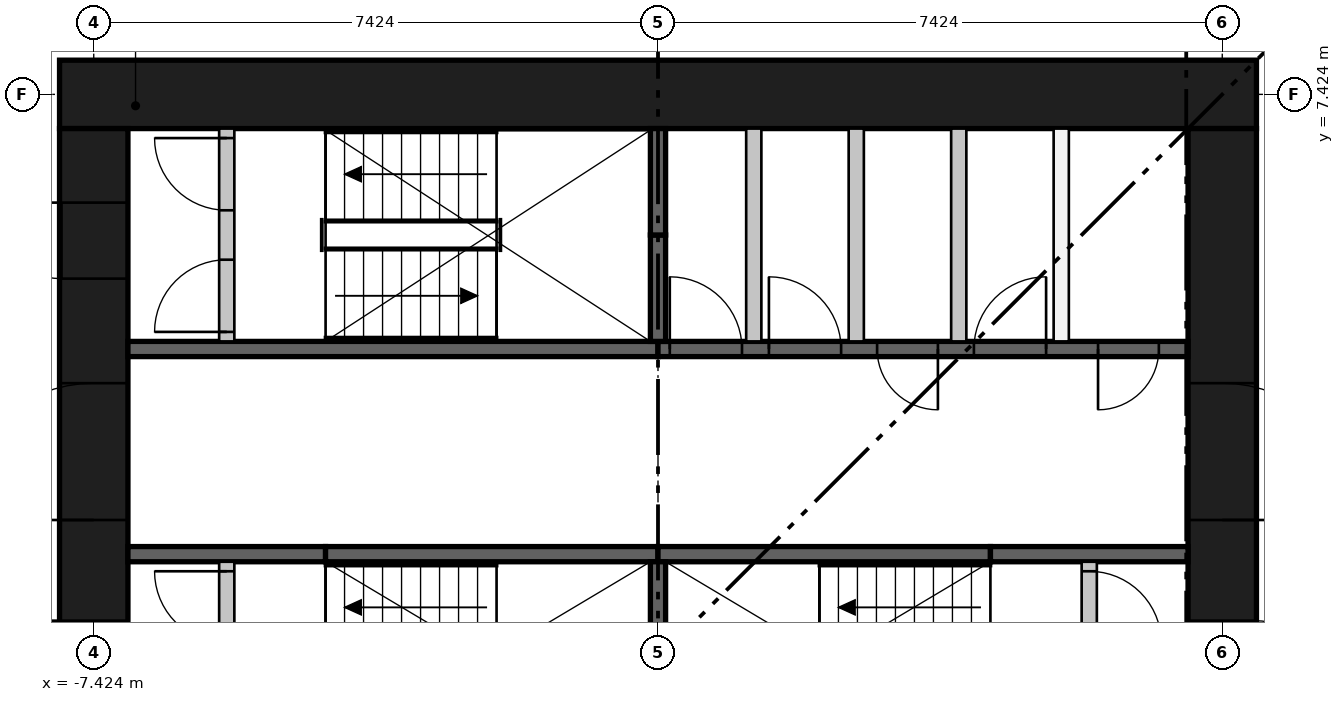
"""IFC4 building model, lengths in metres.
Left out: names, types, materials, properties, quantities, classifications, styles, units other than length and angle.
Written with IfcOpenShell. Run it as: python <this file> out.ifc"""

import sys

from ifc_helpers import new_model, si_unit, direction, frame, frame_2d, origin, place, context, subcontext, project, spatial, rectangle, extrude, element, fill, save


model = new_model("IFC4")
c1 = context("Model", 3, precision=1e-05, world=origin(), true_north=direction((0.0, 1.0)))
c2 = subcontext(c1, "Body", "Model", "MODEL_VIEW")
j1 = project(units=[si_unit("LENGTHUNIT", "METRE"), si_unit("PLANEANGLEUNIT", "RADIAN")], contexts=[c1])
p1 = place(None, origin())
s1 = spatial("IfcSite", under=j1, at=p1, CompositionType="ELEMENT")
p2 = place(p1, origin())
s2 = spatial("IfcBuilding", under=s1, at=p2, CompositionType="ELEMENT")
p3 = place(p2, frame((0.0, 0.0, 48.1)))
s3 = spatial("IfcBuildingStorey", under=s2, at=p3, CompositionType="ELEMENT", Elevation=48.1)
p4 = place(p3, frame((-7.874, 7.424, 0.0), z_axis=(0.0, 0.0, 1.0), x_axis=(1.0, 0.0, 0.0)))
e1 = element("IfcWall", 1, at=p4, inside=s3, PredefinedType="SHEAR", context=c2, shape_type="SweptSolid", body=[
    extrude(rectangle(XDim=15.748, YDim=0.9, at=frame_2d((7.874, 0.0))), origin(), (0.0, 0.0, 1.0), 3.65),
])
p5 = place(p3, frame((-7.424, -6.974, 0.0), z_axis=(0.0, 0.0, 1.0), x_axis=(0.0, 1.0, 0.0)))
e2 = element("IfcWall", 2, at=p5, inside=s3, PredefinedType="SHEAR", context=c2, shape_type="SweptSolid", body=[
    extrude(rectangle(XDim=13.948, YDim=0.9, at=frame_2d((6.974, 0.0))), origin(), (0.0, 0.0, 1.0), 3.65),
])
p6 = place(p5, frame((6.474, 0.0, 0.0)))
e3 = element("IfcOpeningElement", 3, at=p6, cuts=e2, PredefinedType="OPENING", context=c2, shape_type="SweptSolid", body=[
    extrude(rectangle(XDim=1.0, YDim=2.1, at=frame_2d((0.5, 1.05))), frame((0.0, 0.46, 0.0), z_axis=(0.0, -1.0, 0.0), x_axis=(1.0, 0.0, 0.0)), (0.0, 0.0, 1.0), 0.92),
])
p7 = place(p5, frame((3.35, 0.0, 0.0)))
e4 = element("IfcOpeningElement", 4, at=p7, cuts=e2, PredefinedType="OPENING", context=c2, shape_type="SweptSolid", body=[
    extrude(rectangle(XDim=1.8, YDim=2.1, at=frame_2d((0.9, 1.05))), frame((0.0, 0.46, 0.0), z_axis=(0.0, -1.0, 0.0), x_axis=(1.0, 0.0, 0.0)), (0.0, 0.0, 1.0), 0.92),
])
p8 = place(p5, frame((8.799, 0.0, 0.0)))
e5 = element("IfcOpeningElement", 5, at=p8, cuts=e2, PredefinedType="OPENING", context=c2, shape_type="SweptSolid", body=[
    extrude(rectangle(XDim=1.8, YDim=2.1, at=frame_2d((0.9, 1.05))), frame((0.0, 0.46, 0.0), z_axis=(0.0, -1.0, 0.0), x_axis=(1.0, 0.0, 0.0)), (0.0, 0.0, 1.0), 0.92),
])
p9 = place(p5, frame((11.974, 0.0, 0.0)))
e6 = element("IfcOpeningElement", 6, at=p9, cuts=e2, PredefinedType="OPENING", context=c2, shape_type="SweptSolid", body=[
    extrude(rectangle(XDim=1.0, YDim=2.1, at=frame_2d((0.5, 1.05))), frame((0.0, 0.46, 0.0), z_axis=(0.0, -1.0, 0.0), x_axis=(1.0, 0.0, 0.0)), (0.0, 0.0, 1.0), 0.92),
])
p10 = place(p3, frame((7.424, -6.974, 0.0), z_axis=(0.0, 0.0, 1.0), x_axis=(0.0, 1.0, 0.0)))
e7 = element("IfcWall", 7, at=p10, inside=s3, PredefinedType="SHEAR", context=c2, shape_type="SweptSolid", body=[
    extrude(rectangle(XDim=13.948, YDim=0.9, at=frame_2d((6.974, 0.0))), origin(), (0.0, 0.0, 1.0), 3.65),
])
p11 = place(p10, frame((6.474, 0.0, 0.0)))
e8 = element("IfcOpeningElement", 8, at=p11, cuts=e7, PredefinedType="OPENING", context=c2, shape_type="SweptSolid", body=[
    extrude(rectangle(XDim=1.0, YDim=2.1, at=frame_2d((0.5, 1.05))), frame((0.0, 0.46, 0.0), z_axis=(0.0, -1.0, 0.0), x_axis=(1.0, 0.0, 0.0)), (0.0, 0.0, 1.0), 0.92),
])
p12 = place(p10, frame((3.35, 0.0, 0.0)))
e9 = element("IfcOpeningElement", 9, at=p12, cuts=e7, PredefinedType="OPENING", context=c2, shape_type="SweptSolid", body=[
    extrude(rectangle(XDim=1.8, YDim=2.1, at=frame_2d((0.9, 1.05))), frame((0.0, 0.46, 0.0), z_axis=(0.0, -1.0, 0.0), x_axis=(1.0, 0.0, 0.0)), (0.0, 0.0, 1.0), 0.92),
])
p13 = place(p10, frame((8.799, 0.0, 0.0)))
e10 = element("IfcOpeningElement", 10, at=p13, cuts=e7, PredefinedType="OPENING", context=c2, shape_type="SweptSolid", body=[
    extrude(rectangle(XDim=1.8, YDim=2.1, at=frame_2d((0.9, 1.05))), frame((0.0, 0.46, 0.0), z_axis=(0.0, -1.0, 0.0), x_axis=(1.0, 0.0, 0.0)), (0.0, 0.0, 1.0), 0.92),
])
p14 = place(p3, frame((-6.974, 4.074, 0.0), z_axis=(0.0, 0.0, 1.0), x_axis=(1.0, 0.0, 0.0)))
e11 = element("IfcWall", 11, at=p14, inside=s3, PredefinedType="SHEAR", context=c2, shape_type="SweptSolid", body=[
    extrude(rectangle(XDim=6.974, YDim=0.2, at=frame_2d((3.487, 0.0))), origin(), (0.0, 0.0, 1.0), 3.3),
])
p15 = place(p3, frame((0.0, 4.074, 0.0), z_axis=(0.0, 0.0, 1.0), x_axis=(1.0, 0.0, 0.0)))
e12 = element("IfcWall", 12, at=p15, inside=s3, PredefinedType="SHEAR", context=c2, shape_type="SweptSolid", body=[
    extrude(rectangle(XDim=6.974, YDim=0.2, at=frame_2d((3.487, 0.0))), origin(), (0.0, 0.0, 1.0), 3.3),
])
p16 = place(p15, frame((0.155, 0.0, 0.0)))
e13 = element("IfcOpeningElement", 13, at=p16, cuts=e12, PredefinedType="OPENING", context=c2, shape_type="SweptSolid", body=[
    extrude(rectangle(XDim=0.95, YDim=2.1, at=frame_2d((0.475, 1.05))), frame((0.0, 0.11, 0.0), z_axis=(0.0, -1.0, 0.0), x_axis=(1.0, 0.0, 0.0)), (0.0, 0.0, 1.0), 0.22),
])
p17 = place(p15, frame((1.459, 0.0, 0.0)))
e14 = element("IfcOpeningElement", 14, at=p17, cuts=e12, PredefinedType="OPENING", context=c2, shape_type="SweptSolid", body=[
    extrude(rectangle(XDim=0.95, YDim=2.1, at=frame_2d((0.475, 1.05))), frame((0.0, 0.11, 0.0), z_axis=(0.0, -1.0, 0.0), x_axis=(1.0, 0.0, 0.0)), (0.0, 0.0, 1.0), 0.22),
])
p18 = place(p15, frame((2.883, 0.0, 0.0)))
e15 = element("IfcOpeningElement", 15, at=p18, cuts=e12, PredefinedType="OPENING", context=c2, shape_type="SweptSolid", body=[
    extrude(rectangle(XDim=0.8, YDim=2.1, at=frame_2d((0.4, 1.05))), frame((0.0, 0.11, 0.0), z_axis=(0.0, -1.0, 0.0), x_axis=(1.0, 0.0, 0.0)), (0.0, 0.0, 1.0), 0.22),
])
p19 = place(p15, frame((4.156, 0.0, 0.0)))
e16 = element("IfcOpeningElement", 16, at=p19, cuts=e12, PredefinedType="OPENING", context=c2, shape_type="SweptSolid", body=[
    extrude(rectangle(XDim=0.95, YDim=2.1, at=frame_2d((0.475, 1.05))), frame((0.0, 0.11, 0.0), z_axis=(0.0, -1.0, 0.0), x_axis=(1.0, 0.0, 0.0)), (0.0, 0.0, 1.0), 0.22),
])
p20 = place(p15, frame((5.79, 0.0, 0.0)))
e17 = element("IfcOpeningElement", 17, at=p20, cuts=e12, PredefinedType="OPENING", context=c2, shape_type="SweptSolid", body=[
    extrude(rectangle(XDim=0.8, YDim=2.1, at=frame_2d((0.4, 1.05))), frame((0.0, 0.11, 0.0), z_axis=(0.0, -1.0, 0.0), x_axis=(1.0, 0.0, 0.0)), (0.0, 0.0, 1.0), 0.22),
])
p21 = place(p3, frame((-6.974, 1.375, 0.0), z_axis=(0.0, 0.0, 1.0), x_axis=(1.0, 0.0, 0.0)))
e18 = element("IfcWall", 18, at=p21, inside=s3, PredefinedType="SHEAR", context=c2, shape_type="SweptSolid", body=[
    extrude(rectangle(XDim=2.6, YDim=0.2, at=frame_2d((1.3, 0.0))), origin(), (0.0, 0.0, 1.0), 3.3),
])
for number, where, z_axis, x_axis in (
    (19, (-4.374, 1.375, 0.0), (0.0, 0.0, 1.0), (1.0, 0.0, 0.0)),
    (20, (0.0, 1.375, 0.0), (0.0, 0.0, 1.0), (1.0, 0.0, 0.0)),
):
    element("IfcWall", number, at=place(p3, frame(where, z_axis=z_axis, x_axis=x_axis)), inside=s3, PredefinedType="SHEAR", context=c2, shape_type="SweptSolid", body=[
        extrude(rectangle(XDim=4.374, YDim=0.2, at=frame_2d((2.187, 0.0))), origin(), (0.0, 0.0, 1.0), 3.3),
    ])
p22 = place(p3, frame((4.374, 1.375, 0.0), z_axis=(0.0, 0.0, 1.0), x_axis=(1.0, 0.0, 0.0)))
e21 = element("IfcWall", 21, at=p22, inside=s3, PredefinedType="SHEAR", context=c2, shape_type="SweptSolid", body=[
    extrude(rectangle(XDim=2.6, YDim=0.2, at=frame_2d((1.3, 0.0))), origin(), (0.0, 0.0, 1.0), 3.3),
])
p23 = place(p3, frame((0.0, -1.275, 0.0), z_axis=(0.0, 0.0, 1.0), x_axis=(0.0, 1.0, 0.0)))
e22 = element("IfcWall", 22, at=p23, inside=s3, PredefinedType="SHEAR", context=c2, shape_type="SweptSolid", body=[
    extrude(rectangle(XDim=2.55, YDim=0.2, at=frame_2d((1.275, 0.0))), origin(), (0.0, 0.0, 1.0), 3.3),
])
p24 = place(p3, frame((0.0, 4.174, 0.0), z_axis=(0.0, 0.0, 1.0), x_axis=(0.0, 1.0, 0.0)))
e23 = element("IfcWall", 23, at=p24, inside=s3, PredefinedType="SHEAR", context=c2, shape_type="SweptSolid", body=[
    extrude(rectangle(XDim=1.4, YDim=0.2, at=frame_2d((0.7, 0.0))), origin(), (0.0, 0.0, 1.0), 3.3),
])
p25 = place(p3, frame((0.0, 5.574, 0.0), z_axis=(0.0, 0.0, 1.0), x_axis=(0.0, 1.0, 0.0)))
e24 = element("IfcWall", 24, at=p25, inside=s3, PredefinedType="SHEAR", context=c2, shape_type="SweptSolid", body=[
    extrude(rectangle(XDim=1.4, YDim=0.2, at=frame_2d((0.7, 0.0))), origin(), (0.0, 0.0, 1.0), 3.3),
])
for number, where, z_axis, x_axis in (
    (25, (1.26, 4.174, 0.0), (0.0, 0.0, 1.0), (0.0, 1.0, 0.0)),
    (26, (2.609, 4.174, 0.0), (0.0, 0.0, 1.0), (0.0, 1.0, 0.0)),
    (27, (3.957, 4.174, 0.0), (0.0, 0.0, 1.0), (0.0, 1.0, 0.0)),
    (28, (5.305, 4.174, 0.0), (0.0, 0.0, 1.0), (0.0, 1.0, 0.0)),
):
    element("IfcWall", number, at=place(p3, frame(where, z_axis=z_axis, x_axis=x_axis)), inside=s3, PredefinedType="PARTITIONING", context=c2, shape_type="SweptSolid", body=[
        extrude(rectangle(XDim=2.8, YDim=0.2, at=frame_2d((1.4, 0.0))), origin(), (0.0, 0.0, 1.0), 3.3),
    ])
p26 = place(p3, frame((-5.674, -1.275, 0.0), z_axis=(0.0, 0.0, 1.0), x_axis=(0.0, 1.0, 0.0)))
e29 = element("IfcWall", 29, at=p26, inside=s3, PredefinedType="PARTITIONING", context=c2, shape_type="SweptSolid", body=[
    extrude(rectangle(XDim=2.55, YDim=0.2, at=frame_2d((1.275, 0.0))), origin(), (0.0, 0.0, 1.0), 3.3),
])
p27 = place(p26, frame((0.125, 0.0, 0.0)))
e30 = element("IfcOpeningElement", 30, at=p27, cuts=e29, PredefinedType="OPENING", context=c2, shape_type="SweptSolid", body=[
    extrude(rectangle(XDim=0.95, YDim=2.1, at=frame_2d((0.475, 1.05))), frame((0.0, 0.11, 0.0), z_axis=(0.0, -1.0, 0.0), x_axis=(1.0, 0.0, 0.0)), (0.0, 0.0, 1.0), 0.22),
])
p28 = place(p26, frame((1.475, 0.0, 0.0)))
e31 = element("IfcOpeningElement", 31, at=p28, cuts=e29, PredefinedType="OPENING", context=c2, shape_type="SweptSolid", body=[
    extrude(rectangle(XDim=0.95, YDim=2.1, at=frame_2d((0.475, 1.05))), frame((0.0, 0.11, 0.0), z_axis=(0.0, -1.0, 0.0), x_axis=(1.0, 0.0, 0.0)), (0.0, 0.0, 1.0), 0.22),
])
p29 = place(p3, frame((5.674, -1.275, 0.0), z_axis=(0.0, 0.0, 1.0), x_axis=(0.0, 1.0, 0.0)))
e32 = element("IfcWall", 32, at=p29, inside=s3, PredefinedType="PARTITIONING", context=c2, shape_type="SweptSolid", body=[
    extrude(rectangle(XDim=2.55, YDim=0.2, at=frame_2d((1.275, 0.0))), origin(), (0.0, 0.0, 1.0), 3.3),
])
p30 = place(p29, frame((0.125, 0.0, 0.0)))
e33 = element("IfcOpeningElement", 33, at=p30, cuts=e32, PredefinedType="OPENING", context=c2, shape_type="SweptSolid", body=[
    extrude(rectangle(XDim=0.95, YDim=2.1, at=frame_2d((0.475, 1.05))), frame((0.0, 0.11, 0.0), z_axis=(0.0, -1.0, 0.0), x_axis=(1.0, 0.0, 0.0)), (0.0, 0.0, 1.0), 0.22),
])
p31 = place(p29, frame((1.475, 0.0, 0.0)))
e34 = element("IfcOpeningElement", 34, at=p31, cuts=e32, PredefinedType="OPENING", context=c2, shape_type="SweptSolid", body=[
    extrude(rectangle(XDim=0.95, YDim=2.1, at=frame_2d((0.475, 1.05))), frame((0.0, 0.11, 0.0), z_axis=(0.0, -1.0, 0.0), x_axis=(1.0, 0.0, 0.0)), (0.0, 0.0, 1.0), 0.22),
])
p32 = place(p3, frame((-5.674, 4.174, 0.0), z_axis=(0.0, 0.0, 1.0), x_axis=(0.0, 1.0, 0.0)))
e35 = element("IfcWall", 35, at=p32, inside=s3, PredefinedType="PARTITIONING", context=c2, shape_type="SweptSolid", body=[
    extrude(rectangle(XDim=2.8, YDim=0.2, at=frame_2d((1.4, 0.0))), origin(), (0.0, 0.0, 1.0), 3.3),
])
p33 = place(p32, frame((0.125, 0.0, 0.0)))
e36 = element("IfcOpeningElement", 36, at=p33, cuts=e35, PredefinedType="OPENING", context=c2, shape_type="SweptSolid", body=[
    extrude(rectangle(XDim=0.95, YDim=2.1, at=frame_2d((0.475, 1.05))), frame((0.0, 0.11, 0.0), z_axis=(0.0, -1.0, 0.0), x_axis=(1.0, 0.0, 0.0)), (0.0, 0.0, 1.0), 0.22),
])
p34 = place(p32, frame((1.725, 0.0, 0.0)))
e37 = element("IfcOpeningElement", 37, at=p34, cuts=e35, PredefinedType="OPENING", context=c2, shape_type="SweptSolid", body=[
    extrude(rectangle(XDim=0.95, YDim=2.1, at=frame_2d((0.475, 1.05))), frame((0.0, 0.11, 0.0), z_axis=(0.0, -1.0, 0.0), x_axis=(1.0, 0.0, 0.0)), (0.0, 0.0, 1.0), 0.22),
])
p35 = place(p28, origin())
e38 = element("IfcDoor", 38, at=p35, inside=s3, OperationType="SINGLE_SWING_RIGHT", PredefinedType="DOOR", context=c2, shape_type="SweptSolid", body=[
    extrude(rectangle(XDim=0.95, YDim=2.1, at=frame_2d((0.475, 1.05))), frame((0.0, 0.025, 0.0), z_axis=(0.0, -1.0, 0.0), x_axis=(1.0, 0.0, 0.0)), (0.0, 0.0, 1.0), 0.05),
])
fill(e31, e38)
p36 = place(p31, frame((0.95, 0.0, 0.0), z_axis=(0.0, 0.0, 1.0), x_axis=(-1.0, 0.0, 0.0)))
e39 = element("IfcDoor", 39, at=p36, inside=s3, OperationType="SINGLE_SWING_LEFT", PredefinedType="DOOR", context=c2, shape_type="SweptSolid", body=[
    extrude(rectangle(XDim=0.95, YDim=2.1, at=frame_2d((0.475, 1.05))), frame((0.0, 0.025, 0.0), z_axis=(0.0, -1.0, 0.0), x_axis=(1.0, 0.0, 0.0)), (0.0, 0.0, 1.0), 0.05),
])
fill(e34, e39)
p37 = place(p33, origin())
e40 = element("IfcDoor", 40, at=p37, inside=s3, OperationType="SINGLE_SWING_LEFT", PredefinedType="DOOR", context=c2, shape_type="SweptSolid", body=[
    extrude(rectangle(XDim=0.95, YDim=2.1, at=frame_2d((0.475, 1.05))), frame((0.0, 0.025, 0.0), z_axis=(0.0, -1.0, 0.0), x_axis=(1.0, 0.0, 0.0)), (0.0, 0.0, 1.0), 0.05),
])
fill(e36, e40)
p38 = place(p34, origin())
e41 = element("IfcDoor", 41, at=p38, inside=s3, OperationType="SINGLE_SWING_RIGHT", PredefinedType="DOOR", context=c2, shape_type="SweptSolid", body=[
    extrude(rectangle(XDim=0.95, YDim=2.1, at=frame_2d((0.475, 1.05))), frame((0.0, 0.025, 0.0), z_axis=(0.0, -1.0, 0.0), x_axis=(1.0, 0.0, 0.0)), (0.0, 0.0, 1.0), 0.05),
])
fill(e37, e41)
p39 = place(p16, origin())
e42 = element("IfcDoor", 42, at=p39, inside=s3, OperationType="SINGLE_SWING_LEFT", PredefinedType="DOOR", context=c2, shape_type="SweptSolid", body=[
    extrude(rectangle(XDim=0.95, YDim=2.1, at=frame_2d((0.475, 1.05))), frame((0.0, 0.025, 0.0), z_axis=(0.0, -1.0, 0.0), x_axis=(1.0, 0.0, 0.0)), (0.0, 0.0, 1.0), 0.05),
])
fill(e13, e42)
p40 = place(p17, origin())
e43 = element("IfcDoor", 43, at=p40, inside=s3, OperationType="SINGLE_SWING_LEFT", PredefinedType="DOOR", context=c2, shape_type="SweptSolid", body=[
    extrude(rectangle(XDim=0.95, YDim=2.1, at=frame_2d((0.475, 1.05))), frame((0.0, 0.025, 0.0), z_axis=(0.0, -1.0, 0.0), x_axis=(1.0, 0.0, 0.0)), (0.0, 0.0, 1.0), 0.05),
])
fill(e14, e43)
p41 = place(p18, frame((0.8, 0.0, 0.0), z_axis=(0.0, 0.0, 1.0), x_axis=(-1.0, 0.0, 0.0)))
e44 = element("IfcDoor", 44, at=p41, inside=s3, OperationType="SINGLE_SWING_RIGHT", PredefinedType="DOOR", context=c2, shape_type="SweptSolid", body=[
    extrude(rectangle(XDim=0.8, YDim=2.1, at=frame_2d((0.4, 1.05))), frame((0.0, 0.025, 0.0), z_axis=(0.0, -1.0, 0.0), x_axis=(1.0, 0.0, 0.0)), (0.0, 0.0, 1.0), 0.05),
])
fill(e15, e44)
p42 = place(p19, origin())
e45 = element("IfcDoor", 45, at=p42, inside=s3, OperationType="SINGLE_SWING_RIGHT", PredefinedType="DOOR", context=c2, shape_type="SweptSolid", body=[
    extrude(rectangle(XDim=0.95, YDim=2.1, at=frame_2d((0.475, 1.05))), frame((0.0, 0.025, 0.0), z_axis=(0.0, -1.0, 0.0), x_axis=(1.0, 0.0, 0.0)), (0.0, 0.0, 1.0), 0.05),
])
fill(e16, e45)
p43 = place(p20, frame((0.8, 0.0, 0.0), z_axis=(0.0, 0.0, 1.0), x_axis=(-1.0, 0.0, 0.0)))
e46 = element("IfcDoor", 46, at=p43, inside=s3, OperationType="SINGLE_SWING_LEFT", PredefinedType="DOOR", context=c2, shape_type="SweptSolid", body=[
    extrude(rectangle(XDim=0.8, YDim=2.1, at=frame_2d((0.4, 1.05))), frame((0.0, 0.025, 0.0), z_axis=(0.0, -1.0, 0.0), x_axis=(1.0, 0.0, 0.0)), (0.0, 0.0, 1.0), 0.05),
])
fill(e17, e46)
p44 = place(p6, origin())
e47 = element("IfcDoor", 47, at=p44, inside=s3, OperationType="SINGLE_SWING_RIGHT", PredefinedType="DOOR", context=c2, shape_type="SweptSolid", body=[
    extrude(rectangle(XDim=1.0, YDim=2.1, at=frame_2d((0.5, 1.05))), frame((0.0, 0.45, 0.0), z_axis=(0.0, -1.0, 0.0), x_axis=(1.0, 0.0, 0.0)), (0.0, 0.0, 1.0), 0.05),
])
fill(e3, e47)
p45 = place(p8, origin())
e48 = element("IfcDoor", 48, at=p45, inside=s3, OperationType="DOUBLE_DOOR_SINGLE_SWING", PredefinedType="DOOR", context=c2, shape_type="SweptSolid", body=[
    extrude(rectangle(XDim=1.8, YDim=2.1, at=frame_2d((0.9, 1.05))), frame((0.0, 0.025, 0.0), z_axis=(0.0, -1.0, 0.0), x_axis=(1.0, 0.0, 0.0)), (0.0, 0.0, 1.0), 0.05),
])
fill(e5, e48)
p46 = place(p9, origin())
e49 = element("IfcDoor", 49, at=p46, inside=s3, OperationType="SINGLE_SWING_RIGHT", PredefinedType="DOOR", context=c2, shape_type="SweptSolid", body=[
    extrude(rectangle(XDim=1.0, YDim=2.1, at=frame_2d((0.5, 1.05))), frame((0.0, 0.45, 0.0), z_axis=(0.0, -1.0, 0.0), x_axis=(1.0, 0.0, 0.0)), (0.0, 0.0, 1.0), 0.05),
])
fill(e6, e49)
p47 = place(p11, frame((1.0, 0.0, 0.0), z_axis=(0.0, 0.0, 1.0), x_axis=(-1.0, 0.0, 0.0)))
e50 = element("IfcDoor", 50, at=p47, inside=s3, OperationType="SINGLE_SWING_LEFT", PredefinedType="DOOR", context=c2, shape_type="SweptSolid", body=[
    extrude(rectangle(XDim=1.0, YDim=2.1, at=frame_2d((0.5, 1.05))), frame((0.0, 0.45, 0.0), z_axis=(0.0, -1.0, 0.0), x_axis=(1.0, 0.0, 0.0)), (0.0, 0.0, 1.0), 0.05),
])
fill(e8, e50)
p48 = place(p13, frame((1.8, 0.0, 0.0), z_axis=(0.0, 0.0, 1.0), x_axis=(-1.0, 0.0, 0.0)))
e51 = element("IfcDoor", 51, at=p48, inside=s3, OperationType="DOUBLE_DOOR_SINGLE_SWING", PredefinedType="DOOR", context=c2, shape_type="SweptSolid", body=[
    extrude(rectangle(XDim=1.8, YDim=2.1, at=frame_2d((0.9, 1.05))), frame((0.0, 0.025, 0.0), z_axis=(0.0, -1.0, 0.0), x_axis=(1.0, 0.0, 0.0)), (0.0, 0.0, 1.0), 0.05),
])
fill(e10, e51)
save(model, sys.argv[1])
